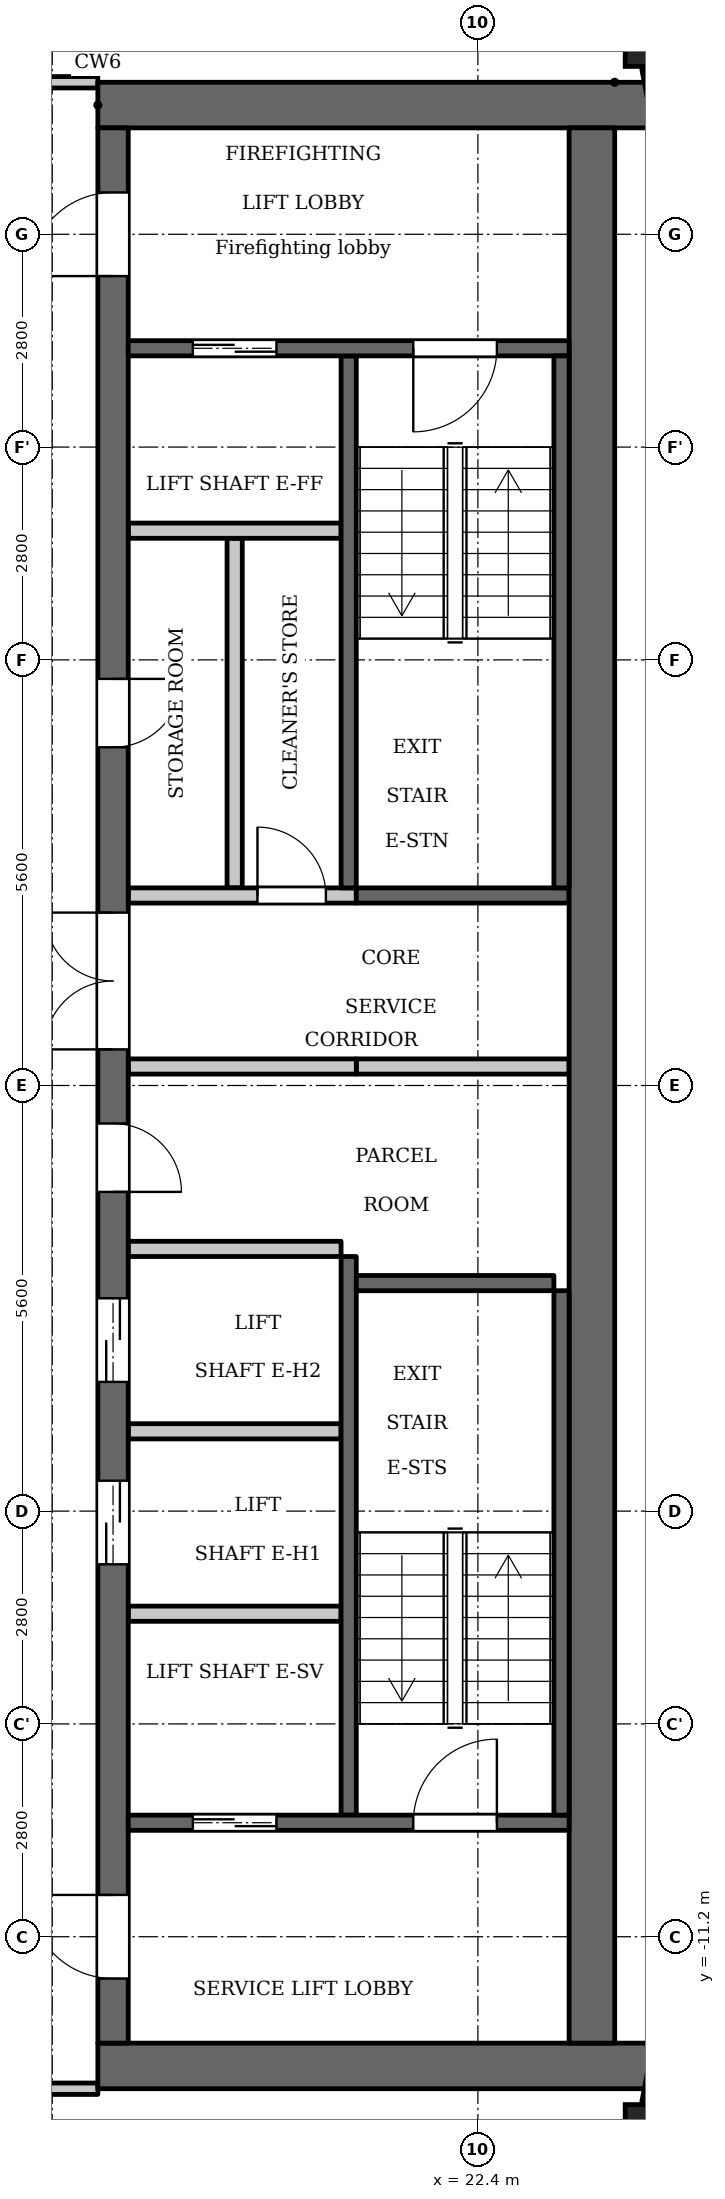
"""IFC4 building model, lengths in metres.
Left out: names, types, materials, properties, quantities, classifications, styles, units other than length and angle.
Written with IfcOpenShell. Run it as: python <this file> out.ifc"""

import sys

from ifc_helpers import new_model, si_unit, direction, frame, frame_2d, origin, origin_2d, place, context, subcontext, project, spatial, rectangle, extrude, element, fill, save


model = new_model("IFC4")
c1 = context("Model", 3, precision=1e-05, world=origin(), true_north=direction((0.0, 1.0)))
c2 = subcontext(c1, "Body", "Model", "MODEL_VIEW")
j1 = project(units=[si_unit("LENGTHUNIT", "METRE"), si_unit("PLANEANGLEUNIT", "RADIAN")], contexts=[c1])
p1 = place(None, origin())
s1 = spatial("IfcSite", under=j1, at=p1, CompositionType="ELEMENT")
p2 = place(p1, origin())
s2 = spatial("IfcBuilding", under=s1, at=p2, CompositionType="ELEMENT")
p3 = place(p2, frame((0.0, 0.0, 252.2)))
s3 = spatial("IfcBuildingStorey", under=s2, at=p3, CompositionType="ELEMENT", Elevation=252.2)
for number, where, z_axis, x_axis in (
    (1, (24.738, -13.809, 0.0), (0.0, 0.0, 1.0), (1.0, 0.0, 0.0)),
    (2, (24.738, 13.809, 0.0), (0.0, 0.0, 1.0), (1.0, 0.0, 0.0)),
):
    element("IfcColumn", number, at=place(p3, frame(where, z_axis=z_axis, x_axis=x_axis)), inside=s3, PredefinedType="COLUMN", context=c2, shape_type="SweptSolid", body=[
        extrude(rectangle(XDim=0.8, YDim=0.8, at=origin_2d()), origin(), (0.0, 0.0, 1.0), 3.5),
    ])
for number, where, z_axis, x_axis in (
    (3, (24.705, -13.395, 0.0), (0.0, 0.0, 1.0), (0.187, 0.982, 0.0)),
    (4, (25.053, 11.572, 0.0), (0.0, 0.0, 1.0), (-0.187, 0.982, 0.0)),
):
    element("IfcWall", number, at=place(p3, frame(where, z_axis=z_axis, x_axis=x_axis)), inside=s3, PredefinedType="SOLIDWALL", context=c2, shape_type="SweptSolid", body=[
        extrude(rectangle(XDim=1.856, YDim=0.3, at=frame_2d((0.928, 0.0))), origin(), (0.0, 0.0, 1.0), 2.55),
    ])
p4 = place(p3, frame((20.7, 2.6, 0.0), z_axis=(0.0, 0.0, 1.0), x_axis=(0.0, 1.0, 0.0)))
e5 = element("IfcWall", 5, at=p4, inside=s3, PredefinedType="SHEAR", context=c2, shape_type="SweptSolid", body=[
    extrude(rectangle(XDim=7.0, YDim=0.2, at=frame_2d((3.5, 0.0))), origin(), (0.0, 0.0, 1.0), 3.2),
])
p5 = place(p3, frame((20.7, -9.6, 0.0), z_axis=(0.0, 0.0, 1.0), x_axis=(0.0, 1.0, 0.0)))
e6 = element("IfcWall", 6, at=p5, inside=s3, PredefinedType="SHEAR", context=c2, shape_type="SweptSolid", body=[
    extrude(rectangle(XDim=7.35, YDim=0.2, at=frame_2d((3.675, 0.0))), origin(), (0.0, 0.0, 1.0), 3.2),
])
p6 = place(p3, frame((20.8, 2.5, 0.0), z_axis=(0.0, 0.0, 1.0), x_axis=(1.0, 0.0, 0.0)))
e7 = element("IfcWall", 7, at=p6, inside=s3, PredefinedType="SHEAR", context=c2, shape_type="SweptSolid", body=[
    extrude(rectangle(XDim=2.8, YDim=0.2, at=frame_2d((1.4, 0.0))), origin(), (0.0, 0.0, 1.0), 3.2),
])
p7 = place(p3, frame((20.8, 0.25, 0.0), z_axis=(0.0, 0.0, 1.0), x_axis=(1.0, 0.0, 0.0)))
e8 = element("IfcWall", 8, at=p7, inside=s3, PredefinedType="PARTITIONING", context=c2, shape_type="SweptSolid", body=[
    extrude(rectangle(XDim=2.8, YDim=0.2, at=frame_2d((1.4, 0.0))), origin(), (0.0, 0.0, 1.0), 3.2),
])
for number, where, z_axis, x_axis in (
    (9, (17.4, 12.9, 0.0), (0.0, 0.0, 1.0), (1.0, 0.0, 0.0)),
    (10, (17.4, -12.9, 0.0), (0.0, 0.0, 1.0), (1.0, 0.0, 0.0)),
):
    element("IfcWall", number, at=place(p3, frame(where, z_axis=z_axis, x_axis=x_axis)), inside=s3, PredefinedType="SHEAR", context=c2, shape_type="SweptSolid", body=[
        extrude(rectangle(XDim=7.32, YDim=0.6, at=frame_2d((3.66, 0.0))), origin(), (0.0, 0.0, 1.0), 3.2),
    ])
p8 = place(p3, frame((19.2, 2.6, 0.0), z_axis=(0.0, 0.0, 1.0), x_axis=(0.0, 1.0, 0.0)))
e11 = element("IfcWall", 11, at=p8, inside=s3, PredefinedType="PARTITIONING", context=c2, shape_type="SweptSolid", body=[
    extrude(rectangle(XDim=4.6, YDim=0.2, at=frame_2d((2.3, 0.0))), origin(), (0.0, 0.0, 1.0), 3.2),
])
p9 = place(p3, frame((17.6, -12.6, 0.0), z_axis=(0.0, 0.0, 1.0), x_axis=(0.0, 1.0, 0.0)))
e12 = element("IfcWall", 12, at=p9, inside=s3, PredefinedType="SHEAR", context=c2, shape_type="SweptSolid", body=[
    extrude(rectangle(XDim=25.2, YDim=0.4, at=frame_2d((12.6, 0.0))), origin(), (0.0, 0.0, 1.0), 3.2),
])
p10 = place(p9, frame((6.3, 0.0, 0.0)))
e13 = element("IfcOpeningElement", 13, at=p10, cuts=e12, PredefinedType="OPENING", context=c2, shape_type="SweptSolid", body=[
    extrude(rectangle(XDim=1.1, YDim=2.1, at=frame_2d((0.55, 1.05))), frame((0.0, 0.21, 0.0), z_axis=(0.0, -1.0, 0.0), x_axis=(1.0, 0.0, 0.0)), (0.0, 0.0, 1.0), 0.42),
])
p11 = place(p9, frame((8.7, 0.0, 0.0)))
e14 = element("IfcOpeningElement", 14, at=p11, cuts=e12, PredefinedType="OPENING", context=c2, shape_type="SweptSolid", body=[
    extrude(rectangle(XDim=1.1, YDim=2.1, at=frame_2d((0.55, 1.05))), frame((0.0, 0.21, 0.0), z_axis=(0.0, -1.0, 0.0), x_axis=(1.0, 0.0, 0.0)), (0.0, 0.0, 1.0), 0.42),
])
p12 = place(p9, frame((11.2, 0.0, 0.0)))
e15 = element("IfcOpeningElement", 15, at=p12, cuts=e12, PredefinedType="OPENING", context=c2, shape_type="SweptSolid", body=[
    extrude(rectangle(XDim=0.9, YDim=2.1, at=frame_2d((0.45, 1.05))), frame((0.0, 0.21, 0.0), z_axis=(0.0, -1.0, 0.0), x_axis=(1.0, 0.0, 0.0)), (0.0, 0.0, 1.0), 0.42),
])
p13 = place(p9, frame((17.05, 0.0, 0.0)))
e16 = element("IfcOpeningElement", 16, at=p13, cuts=e12, PredefinedType="OPENING", context=c2, shape_type="SweptSolid", body=[
    extrude(rectangle(XDim=0.9, YDim=2.1, at=frame_2d((0.45, 1.05))), frame((0.0, 0.21, 0.0), z_axis=(0.0, -1.0, 0.0), x_axis=(1.0, 0.0, 0.0)), (0.0, 0.0, 1.0), 0.42),
])
p14 = place(p9, frame((23.25, 0.0, 0.0)))
e17 = element("IfcOpeningElement", 17, at=p14, cuts=e12, PredefinedType="OPENING", context=c2, shape_type="SweptSolid", body=[
    extrude(rectangle(XDim=1.1, YDim=2.1, at=frame_2d((0.55, 1.05))), frame((0.0, 0.21, 0.0), z_axis=(0.0, -1.0, 0.0), x_axis=(1.0, 0.0, 0.0)), (0.0, 0.0, 1.0), 0.42),
])
p15 = place(p9, frame((0.85, 0.0, 0.0)))
e18 = element("IfcOpeningElement", 18, at=p15, cuts=e12, PredefinedType="OPENING", context=c2, shape_type="SweptSolid", body=[
    extrude(rectangle(XDim=1.1, YDim=2.1, at=frame_2d((0.55, 1.05))), frame((0.0, 0.21, 0.0), z_axis=(0.0, -1.0, 0.0), x_axis=(1.0, 0.0, 0.0)), (0.0, 0.0, 1.0), 0.42),
])
p16 = place(p9, frame((13.075, 0.0, 0.0)))
e19 = element("IfcOpeningElement", 19, at=p16, cuts=e12, PredefinedType="OPENING", context=c2, shape_type="SweptSolid", body=[
    extrude(rectangle(XDim=1.8, YDim=2.1, at=frame_2d((0.9, 1.05))), frame((0.0, 0.21, 0.0), z_axis=(0.0, -1.0, 0.0), x_axis=(1.0, 0.0, 0.0)), (0.0, 0.0, 1.0), 0.42),
])
p17 = place(p3, frame((23.9, -12.6, 0.0), z_axis=(0.0, 0.0, 1.0), x_axis=(0.0, 1.0, 0.0)))
e20 = element("IfcWall", 20, at=p17, inside=s3, PredefinedType="SHEAR", context=c2, shape_type="SweptSolid", body=[
    extrude(rectangle(XDim=25.2, YDim=0.6, at=frame_2d((12.6, 0.0))), origin(), (0.0, 0.0, 1.0), 3.2),
])
p18 = place(p3, frame((17.8, -9.7, 0.0), z_axis=(0.0, 0.0, 1.0), x_axis=(1.0, 0.0, 0.0)))
e21 = element("IfcWall", 21, at=p18, inside=s3, PredefinedType="SHEAR", context=c2, shape_type="SweptSolid", body=[
    extrude(rectangle(XDim=5.8, YDim=0.2, at=frame_2d((2.9, 0.0))), origin(), (0.0, 0.0, 1.0), 3.2),
])
p19 = place(p18, frame((0.85, 0.0, 0.0)))
e22 = element("IfcOpeningElement", 22, at=p19, cuts=e21, PredefinedType="OPENING", context=c2, shape_type="SweptSolid", body=[
    extrude(rectangle(XDim=1.1, YDim=2.1, at=frame_2d((0.55, 1.05))), frame((0.0, 0.11, 0.0), z_axis=(0.0, -1.0, 0.0), x_axis=(1.0, 0.0, 0.0)), (0.0, 0.0, 1.0), 0.22),
])
p20 = place(p18, frame((3.75, 0.0, 0.0)))
e23 = element("IfcOpeningElement", 23, at=p20, cuts=e21, PredefinedType="OPENING", context=c2, shape_type="SweptSolid", body=[
    extrude(rectangle(XDim=1.1, YDim=2.1, at=frame_2d((0.55, 1.05))), frame((0.0, 0.11, 0.0), z_axis=(0.0, -1.0, 0.0), x_axis=(1.0, 0.0, 0.0)), (0.0, 0.0, 1.0), 0.22),
])
for number, where, z_axis, x_axis in (
    (24, (17.8, -6.95, 0.0), (0.0, 0.0, 1.0), (1.0, 0.0, 0.0)),
    (25, (17.8, -4.55, 0.0), (0.0, 0.0, 1.0), (1.0, 0.0, 0.0)),
    (26, (17.8, -2.15, 0.0), (0.0, 0.0, 1.0), (1.0, 0.0, 0.0)),
):
    element("IfcWall", number, at=place(p3, frame(where, z_axis=z_axis, x_axis=x_axis)), inside=s3, PredefinedType="PARTITIONING", context=c2, shape_type="SweptSolid", body=[
        extrude(rectangle(XDim=2.8, YDim=0.2, at=frame_2d((1.4, 0.0))), origin(), (0.0, 0.0, 1.0), 3.2),
    ])
p21 = place(p3, frame((17.8, 0.25, 0.0), z_axis=(0.0, 0.0, 1.0), x_axis=(1.0, 0.0, 0.0)))
e27 = element("IfcWall", 27, at=p21, inside=s3, PredefinedType="PARTITIONING", context=c2, shape_type="SweptSolid", body=[
    extrude(rectangle(XDim=3.0, YDim=0.2, at=frame_2d((1.5, 0.0))), origin(), (0.0, 0.0, 1.0), 3.2),
])
p22 = place(p3, frame((17.8, 2.5, 0.0), z_axis=(0.0, 0.0, 1.0), x_axis=(1.0, 0.0, 0.0)))
e28 = element("IfcWall", 28, at=p22, inside=s3, PredefinedType="PARTITIONING", context=c2, shape_type="SweptSolid", body=[
    extrude(rectangle(XDim=3.0, YDim=0.2, at=frame_2d((1.5, 0.0))), origin(), (0.0, 0.0, 1.0), 3.2),
])
p23 = place(p22, frame((1.7, 0.0, 0.0)))
e29 = element("IfcOpeningElement", 29, at=p23, cuts=e28, PredefinedType="OPENING", context=c2, shape_type="SweptSolid", body=[
    extrude(rectangle(XDim=0.9, YDim=2.1, at=frame_2d((0.45, 1.05))), frame((0.0, 0.11, 0.0), z_axis=(0.0, -1.0, 0.0), x_axis=(1.0, 0.0, 0.0)), (0.0, 0.0, 1.0), 0.22),
])
p24 = place(p3, frame((17.8, 7.3, 0.0), z_axis=(0.0, 0.0, 1.0), x_axis=(1.0, 0.0, 0.0)))
e30 = element("IfcWall", 30, at=p24, inside=s3, PredefinedType="PARTITIONING", context=c2, shape_type="SweptSolid", body=[
    extrude(rectangle(XDim=2.8, YDim=0.2, at=frame_2d((1.4, 0.0))), origin(), (0.0, 0.0, 1.0), 3.2),
])
p25 = place(p3, frame((17.8, 9.7, 0.0), z_axis=(0.0, 0.0, 1.0), x_axis=(1.0, 0.0, 0.0)))
e31 = element("IfcWall", 31, at=p25, inside=s3, PredefinedType="SHEAR", context=c2, shape_type="SweptSolid", body=[
    extrude(rectangle(XDim=5.8, YDim=0.2, at=frame_2d((2.9, 0.0))), origin(), (0.0, 0.0, 1.0), 3.2),
])
p26 = place(p25, frame((0.85, 0.0, 0.0)))
e32 = element("IfcOpeningElement", 32, at=p26, cuts=e31, PredefinedType="OPENING", context=c2, shape_type="SweptSolid", body=[
    extrude(rectangle(XDim=1.1, YDim=2.1, at=frame_2d((0.55, 1.05))), frame((0.0, 0.11, 0.0), z_axis=(0.0, -1.0, 0.0), x_axis=(1.0, 0.0, 0.0)), (0.0, 0.0, 1.0), 0.22),
])
p27 = place(p25, frame((3.75, 0.0, 0.0)))
e33 = element("IfcOpeningElement", 33, at=p27, cuts=e31, PredefinedType="OPENING", context=c2, shape_type="SweptSolid", body=[
    extrude(rectangle(XDim=1.1, YDim=2.1, at=frame_2d((0.55, 1.05))), frame((0.0, 0.11, 0.0), z_axis=(0.0, -1.0, 0.0), x_axis=(1.0, 0.0, 0.0)), (0.0, 0.0, 1.0), 0.22),
])
p28 = place(p3, frame((23.5, 2.6, 0.0), z_axis=(0.0, 0.0, 1.0), x_axis=(0.0, 1.0, 0.0)))
e34 = element("IfcWall", 34, at=p28, inside=s3, PredefinedType="SHEAR", context=c2, shape_type="SweptSolid", body=[
    extrude(rectangle(XDim=7.0, YDim=0.2, at=frame_2d((3.5, 0.0))), origin(), (0.0, 0.0, 1.0), 3.2),
])
p29 = place(p3, frame((23.5, -9.6, 0.0), z_axis=(0.0, 0.0, 1.0), x_axis=(0.0, 1.0, 0.0)))
e35 = element("IfcWall", 35, at=p29, inside=s3, PredefinedType="SHEAR", context=c2, shape_type="SweptSolid", body=[
    extrude(rectangle(XDim=6.9, YDim=0.2, at=frame_2d((3.45, 0.0))), origin(), (0.0, 0.0, 1.0), 3.2),
])
p30 = place(p3, frame((20.8, -2.6, 0.0), z_axis=(0.0, 0.0, 1.0), x_axis=(1.0, 0.0, 0.0)))
e36 = element("IfcWall", 36, at=p30, inside=s3, PredefinedType="SHEAR", context=c2, shape_type="SweptSolid", body=[
    extrude(rectangle(XDim=2.6, YDim=0.2, at=frame_2d((1.3, 0.0))), origin(), (0.0, 0.0, 1.0), 3.2),
])
p31 = place(p3, frame((15.075, -13.2, 0.0), z_axis=(0.0, 0.0, 1.0), x_axis=(1.0, 0.0, 0.0)))
e37 = element("IfcWall", 37, at=p31, inside=s3, PredefinedType="PARTITIONING", context=c2, shape_type="SweptSolid", body=[
    extrude(rectangle(XDim=2.325, YDim=0.15, at=frame_2d((1.163, 0.0))), origin(), (0.0, 0.0, 1.0), 3.2),
])
p32 = place(p31, frame((0.575, 0.0, 0.0)))
e38 = element("IfcOpeningElement", 38, at=p32, cuts=e37, PredefinedType="OPENING", context=c2, shape_type="SweptSolid", body=[
    extrude(rectangle(XDim=1.0, YDim=2.1, at=frame_2d((0.5, 1.05))), frame((0.0, 0.085, 0.0), z_axis=(0.0, -1.0, 0.0), x_axis=(1.0, 0.0, 0.0)), (0.0, 0.0, 1.0), 0.17),
])
p33 = place(p3, frame((15.075, 13.2, 0.0), z_axis=(0.0, 0.0, 1.0), x_axis=(1.0, 0.0, 0.0)))
e39 = element("IfcWall", 39, at=p33, inside=s3, PredefinedType="PARTITIONING", context=c2, shape_type="SweptSolid", body=[
    extrude(rectangle(XDim=2.325, YDim=0.15, at=frame_2d((1.163, 0.0))), origin(), (0.0, 0.0, 1.0), 3.2),
])
p34 = place(p33, frame((0.675, 0.0, 0.0)))
e40 = element("IfcOpeningElement", 40, at=p34, cuts=e39, PredefinedType="OPENING", context=c2, shape_type="SweptSolid", body=[
    extrude(rectangle(XDim=1.0, YDim=2.1, at=frame_2d((0.5, 1.05))), frame((0.0, 0.085, 0.0), z_axis=(0.0, -1.0, 0.0), x_axis=(1.0, 0.0, 0.0)), (0.0, 0.0, 1.0), 0.17),
])
p35 = place(p19, origin())
e41 = element("IfcDoor", 41, at=p35, inside=s3, OperationType="DOUBLE_DOOR_SLIDING", PredefinedType="DOOR", context=c2, shape_type="SweptSolid", body=[
    extrude(rectangle(XDim=1.1, YDim=2.1, at=frame_2d((0.55, 1.05))), frame((0.0, 0.025, 0.0), z_axis=(0.0, -1.0, 0.0), x_axis=(1.0, 0.0, 0.0)), (0.0, 0.0, 1.0), 0.05),
])
fill(e22, e41)
p36 = place(p10, origin())
e42 = element("IfcDoor", 42, at=p36, inside=s3, OperationType="DOUBLE_DOOR_SLIDING", PredefinedType="DOOR", context=c2, shape_type="SweptSolid", body=[
    extrude(rectangle(XDim=1.1, YDim=2.1, at=frame_2d((0.55, 1.05))), frame((0.0, 0.025, 0.0), z_axis=(0.0, -1.0, 0.0), x_axis=(1.0, 0.0, 0.0)), (0.0, 0.0, 1.0), 0.05),
])
fill(e13, e42)
p37 = place(p11, origin())
e43 = element("IfcDoor", 43, at=p37, inside=s3, OperationType="DOUBLE_DOOR_SLIDING", PredefinedType="DOOR", context=c2, shape_type="SweptSolid", body=[
    extrude(rectangle(XDim=1.1, YDim=2.1, at=frame_2d((0.55, 1.05))), frame((0.0, 0.025, 0.0), z_axis=(0.0, -1.0, 0.0), x_axis=(1.0, 0.0, 0.0)), (0.0, 0.0, 1.0), 0.05),
])
fill(e14, e43)
p38 = place(p12, origin())
e44 = element("IfcDoor", 44, at=p38, inside=s3, OperationType="SINGLE_SWING_LEFT", PredefinedType="DOOR", context=c2, shape_type="SweptSolid", body=[
    extrude(rectangle(XDim=0.9, YDim=2.1, at=frame_2d((0.45, 1.05))), frame((0.0, 0.025, 0.0), z_axis=(0.0, -1.0, 0.0), x_axis=(1.0, 0.0, 0.0)), (0.0, 0.0, 1.0), 0.05),
])
fill(e15, e44)
p39 = place(p13, origin())
e45 = element("IfcDoor", 45, at=p39, inside=s3, OperationType="SINGLE_SWING_RIGHT", PredefinedType="DOOR", context=c2, shape_type="SweptSolid", body=[
    extrude(rectangle(XDim=0.9, YDim=2.1, at=frame_2d((0.45, 1.05))), frame((0.0, 0.025, 0.0), z_axis=(0.0, -1.0, 0.0), x_axis=(1.0, 0.0, 0.0)), (0.0, 0.0, 1.0), 0.05),
])
fill(e16, e45)
p40 = place(p23, origin())
e46 = element("IfcDoor", 46, at=p40, inside=s3, OperationType="SINGLE_SWING_RIGHT", PredefinedType="DOOR", context=c2, shape_type="SweptSolid", body=[
    extrude(rectangle(XDim=0.9, YDim=2.1, at=frame_2d((0.45, 1.05))), frame((0.0, 0.025, 0.0), z_axis=(0.0, -1.0, 0.0), x_axis=(1.0, 0.0, 0.0)), (0.0, 0.0, 1.0), 0.05),
])
fill(e29, e46)
p41 = place(p26, origin())
e47 = element("IfcDoor", 47, at=p41, inside=s3, OperationType="DOUBLE_DOOR_SLIDING", PredefinedType="DOOR", context=c2, shape_type="SweptSolid", body=[
    extrude(rectangle(XDim=1.1, YDim=2.1, at=frame_2d((0.55, 1.05))), frame((0.0, 0.025, 0.0), z_axis=(0.0, -1.0, 0.0), x_axis=(1.0, 0.0, 0.0)), (0.0, 0.0, 1.0), 0.05),
])
fill(e32, e47)
p42 = place(p14, origin())
e48 = element("IfcDoor", 48, at=p42, inside=s3, OperationType="SINGLE_SWING_RIGHT", PredefinedType="DOOR", context=c2, shape_type="SweptSolid", body=[
    extrude(rectangle(XDim=1.1, YDim=2.1, at=frame_2d((0.55, 1.05))), frame((0.0, 0.025, 0.0), z_axis=(0.0, -1.0, 0.0), x_axis=(1.0, 0.0, 0.0)), (0.0, 0.0, 1.0), 0.05),
])
fill(e17, e48)
p43 = place(p15, origin())
e49 = element("IfcDoor", 49, at=p43, inside=s3, OperationType="SINGLE_SWING_LEFT", PredefinedType="DOOR", context=c2, shape_type="SweptSolid", body=[
    extrude(rectangle(XDim=1.1, YDim=2.1, at=frame_2d((0.55, 1.05))), frame((0.0, 0.025, 0.0), z_axis=(0.0, -1.0, 0.0), x_axis=(1.0, 0.0, 0.0)), (0.0, 0.0, 1.0), 0.05),
])
fill(e18, e49)
p44 = place(p27, origin())
e50 = element("IfcDoor", 50, at=p44, inside=s3, OperationType="SINGLE_SWING_LEFT", PredefinedType="DOOR", context=c2, shape_type="SweptSolid", body=[
    extrude(rectangle(XDim=1.1, YDim=2.1, at=frame_2d((0.55, 1.05))), frame((0.0, 0.025, 0.0), z_axis=(0.0, -1.0, 0.0), x_axis=(1.0, 0.0, 0.0)), (0.0, 0.0, 1.0), 0.05),
])
fill(e33, e50)
p45 = place(p20, origin())
e51 = element("IfcDoor", 51, at=p45, inside=s3, OperationType="SINGLE_SWING_LEFT", PredefinedType="DOOR", context=c2, shape_type="SweptSolid", body=[
    extrude(rectangle(XDim=1.1, YDim=2.1, at=frame_2d((0.55, 1.05))), frame((0.0, 0.025, 0.0), z_axis=(0.0, -1.0, 0.0), x_axis=(1.0, 0.0, 0.0)), (0.0, 0.0, 1.0), 0.05),
])
fill(e23, e51)
p46 = place(p16, origin())
e52 = element("IfcDoor", 52, at=p46, inside=s3, OperationType="DOUBLE_DOOR_SINGLE_SWING", PredefinedType="DOOR", context=c2, shape_type="SweptSolid", body=[
    extrude(rectangle(XDim=1.8, YDim=2.1, at=frame_2d((0.9, 1.05))), frame((0.0, 0.025, 0.0), z_axis=(0.0, -1.0, 0.0), x_axis=(1.0, 0.0, 0.0)), (0.0, 0.0, 1.0), 0.05),
])
fill(e19, e52)
save(model, sys.argv[1])
